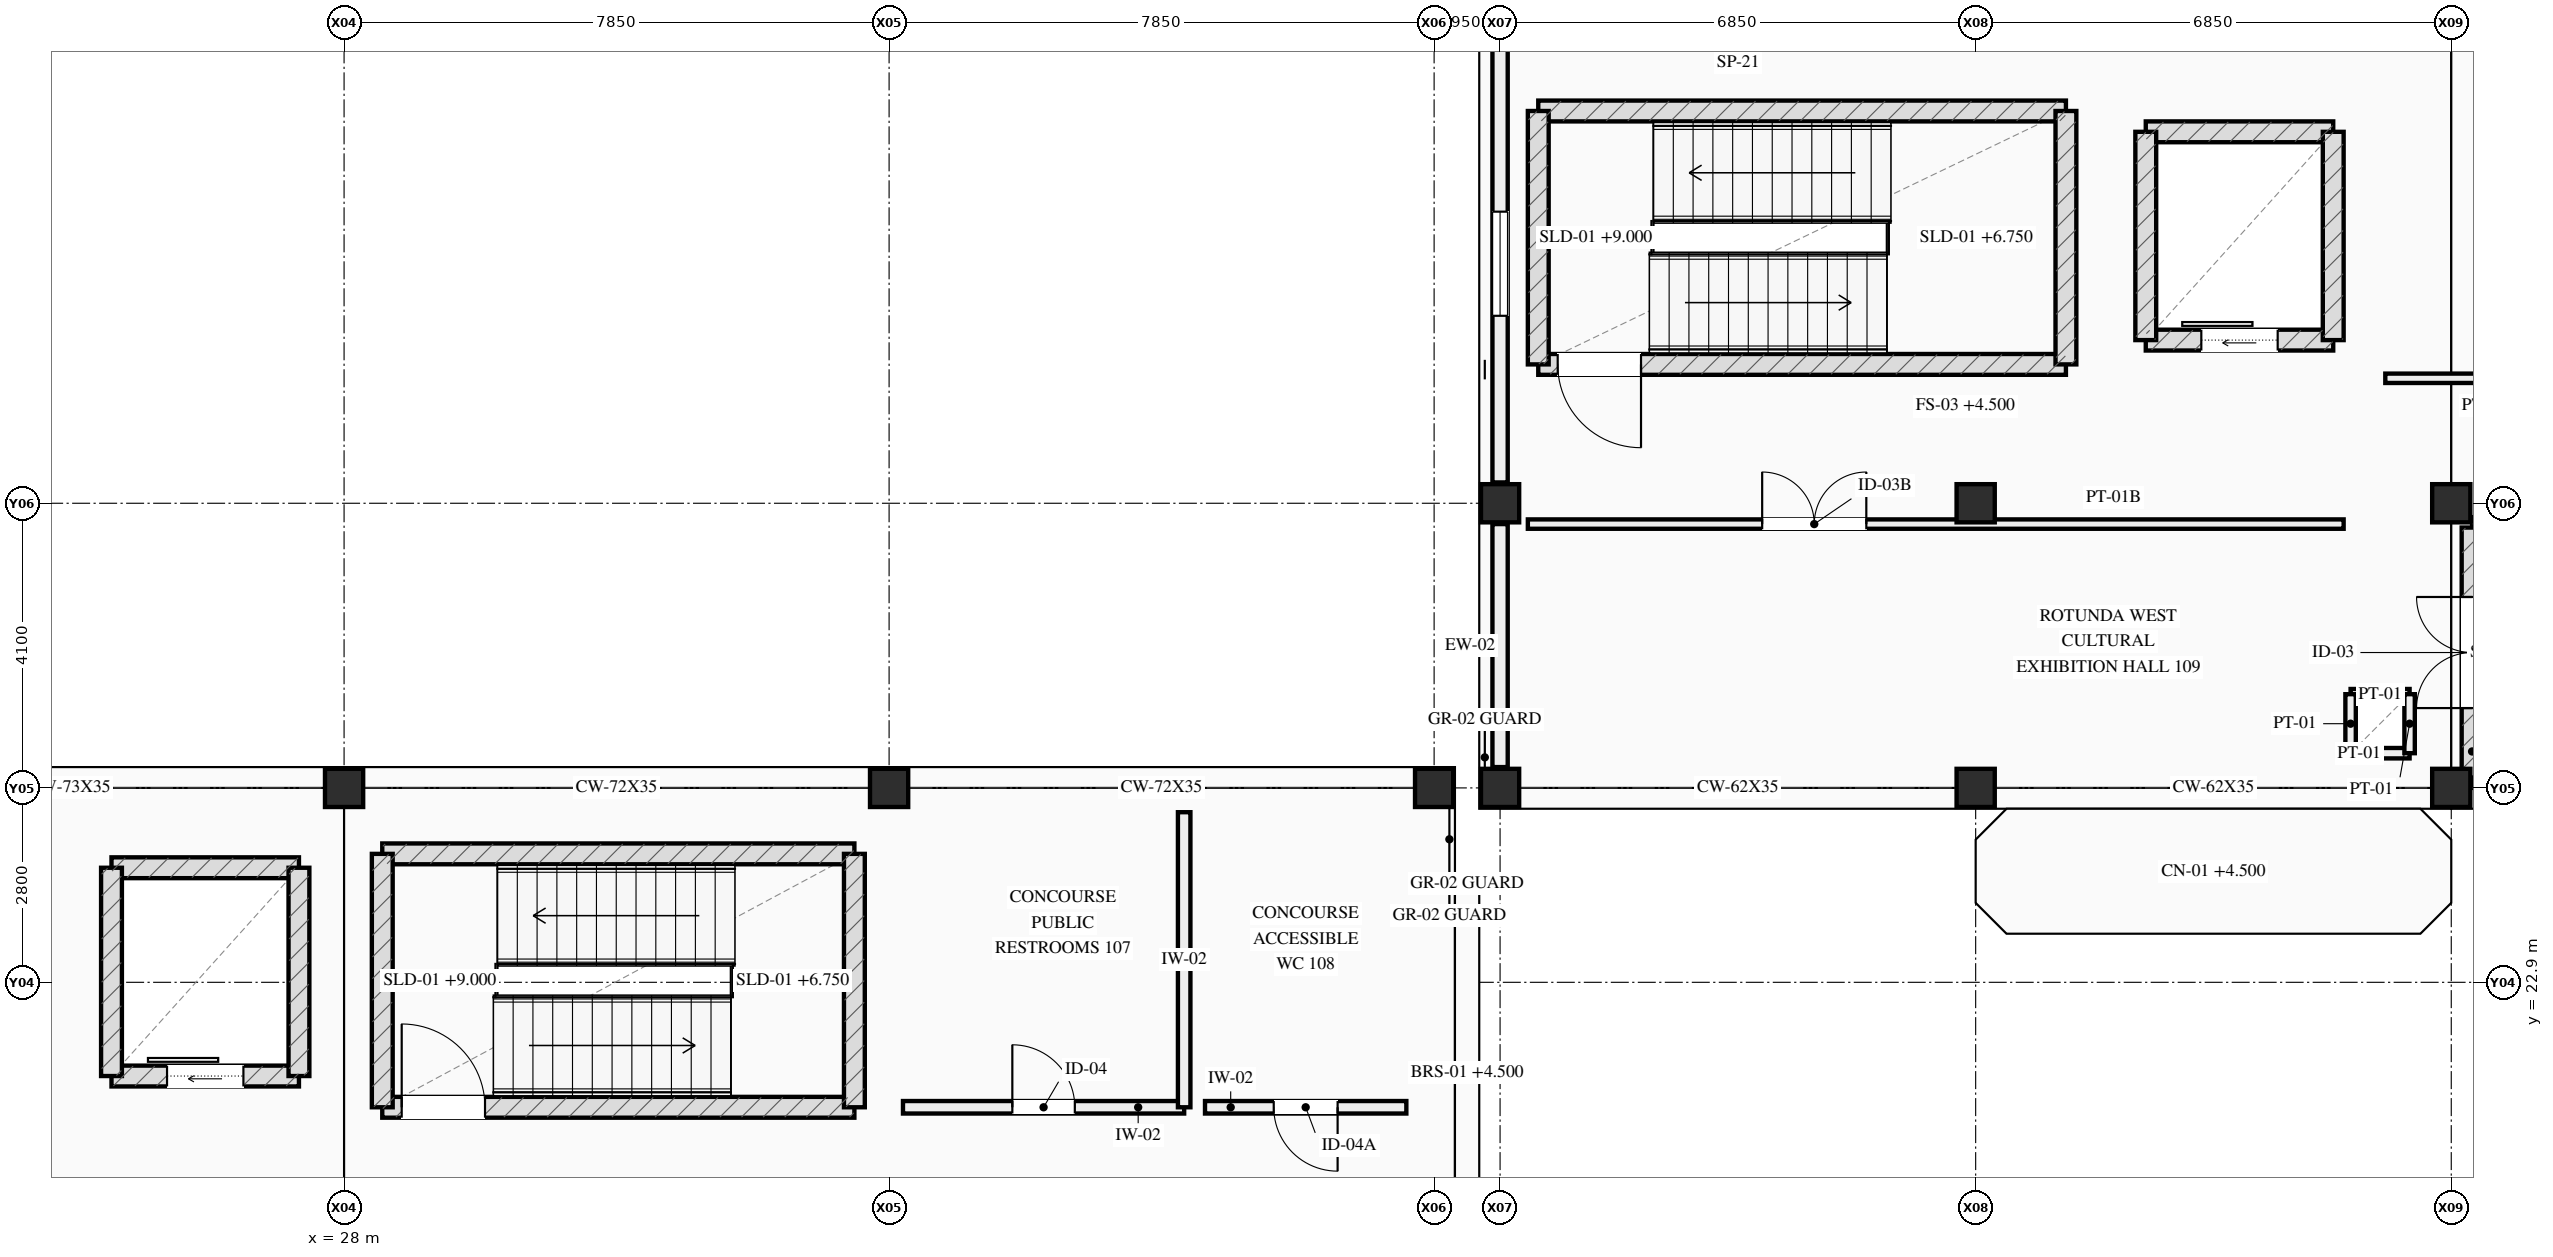
"""IFC4 building model, lengths in metres.
Left out: names, types, materials, properties, quantities, classifications, styles, units other than length and angle.
Written with IfcOpenShell. Run it as: python <this file> out.ifc"""

import sys

from ifc_helpers import new_model, si_unit, direction, frame, frame_2d, origin, origin_2d, place, context, subcontext, project, spatial, rectangle, extrude, element, fill, save


model = new_model("IFC4")
c1 = context("Model", 3, precision=1e-05, world=origin(), true_north=direction((0.0, 1.0)))
c2 = subcontext(c1, "Body", "Model", "MODEL_VIEW")
j1 = project(units=[si_unit("LENGTHUNIT", "METRE"), si_unit("PLANEANGLEUNIT", "RADIAN")], contexts=[c1])
p1 = place(None, origin())
s1 = spatial("IfcSite", under=j1, at=p1, CompositionType="ELEMENT")
p2 = place(p1, origin())
s2 = spatial("IfcBuilding", under=s1, at=p2, CompositionType="ELEMENT")
p3 = place(p2, frame((0.0, 0.0, 4.5)))
s3 = spatial("IfcBuildingStorey", under=s2, at=p3, CompositionType="ELEMENT", Elevation=4.5)
for number, where, z_axis, x_axis in (
    (1, (28.0, 25.7, 0.0), (0.0, 0.0, 1.0), (1.0, 0.0, 0.0)),
    (2, (35.85, 25.7, 0.0), (0.0, 0.0, 1.0), (1.0, 0.0, 0.0)),
    (3, (43.7, 25.7, 0.0), (0.0, 0.0, 1.0), (1.0, 0.0, 0.0)),
    (4, (44.65, 25.7, 0.0), (0.0, 0.0, 1.0), (1.0, 0.0, 0.0)),
    (5, (44.65, 29.8, 0.0), (0.0, 0.0, 1.0), (1.0, 0.0, 0.0)),
    (6, (51.5, 25.7, 0.0), (0.0, 0.0, 1.0), (1.0, 0.0, 0.0)),
    (7, (51.5, 29.8, 0.0), (0.0, 0.0, 1.0), (1.0, 0.0, 0.0)),
    (8, (58.35, 25.7, 0.0), (0.0, 0.0, 1.0), (1.0, 0.0, 0.0)),
    (9, (58.35, 29.8, 0.0), (0.0, 0.0, 1.0), (1.0, 0.0, 0.0)),
):
    element("IfcColumn", number, at=place(p3, frame(where, z_axis=z_axis, x_axis=x_axis)), inside=s3, PredefinedType="COLUMN", context=c2, shape_type="SweptSolid", body=[
        extrude(rectangle(XDim=0.55, YDim=0.55, at=origin_2d()), origin(), (0.0, 0.0, 1.0), 4.5),
    ])
p4 = place(p3, frame((44.65, 26.0, 0.0), z_axis=(0.0, 0.0, 1.0), x_axis=(0.0, 1.0, 0.0)))
e10 = element("IfcWall", 10, at=p4, inside=s3, PredefinedType="STANDARD", context=c2, shape_type="SweptSolid", body=[
    extrude(rectangle(XDim=3.5, YDim=0.22, at=frame_2d((1.75, 0.0))), origin(), (0.0, 0.0, 1.0), 3.58),
])
p5 = place(p3, frame((44.65, 30.1, 0.0), z_axis=(0.0, 0.0, 1.0), x_axis=(0.0, 1.0, 0.0)))
e11 = element("IfcWall", 11, at=p5, inside=s3, PredefinedType="STANDARD", context=c2, shape_type="SweptSolid", body=[
    extrude(rectangle(XDim=6.3, YDim=0.22, at=frame_2d((3.15, 0.0))), origin(), (0.0, 0.0, 1.0), 3.58),
])
p6 = place(p5, frame((2.4, 0.0, 0.95)))
e12 = element("IfcOpeningElement", 12, at=p6, cuts=e11, PredefinedType="OPENING", context=c2, shape_type="SweptSolid", body=[
    extrude(rectangle(XDim=1.5, YDim=1.45, at=frame_2d((0.75, 0.725))), frame((0.0, 0.12, 0.0), z_axis=(0.0, -1.0, 0.0), x_axis=(1.0, 0.0, 0.0)), (0.0, 0.0, 1.0), 0.24),
])
for number, where, z_axis, x_axis in (
    (13, (56.9, 26.2, 0.0), (0.0, 0.0, 1.0), (1.0, 0.0, 0.0)),
    (14, (56.9, 27.05, 0.0), (0.0, 0.0, 1.0), (1.0, 0.0, 0.0)),
    (15, (56.9, 26.2, 0.0), (0.0, 0.0, 1.0), (0.0, 1.0, 0.0)),
    (16, (57.75, 26.2, 0.0), (0.0, 0.0, 1.0), (0.0, 1.0, 0.0)),
):
    element("IfcWall", number, at=place(p3, frame(where, z_axis=z_axis, x_axis=x_axis)), inside=s3, PredefinedType="PARTITIONING", context=c2, shape_type="SweptSolid", body=[
        extrude(rectangle(XDim=0.85, YDim=0.15, at=frame_2d((0.425, 0.0))), origin(), (0.0, 0.0, 1.0), 3.3),
    ])
p7 = place(p3, frame((28.55, 21.1, 0.0), z_axis=(0.0, 0.0, 1.0), x_axis=(1.0, 0.0, 0.0)))
e17 = element("IfcWall", 17, at=p7, inside=s3, PredefinedType="SHEAR", context=c2, shape_type="SweptSolid", body=[
    extrude(rectangle(XDim=6.8, YDim=0.3, at=frame_2d((3.4, 0.0))), origin(), (0.0, 0.0, 1.0), 4.25),
])
p8 = place(p7, frame((0.28, 0.0, 0.0)))
e18 = element("IfcOpeningElement", 18, at=p8, cuts=e17, PredefinedType="OPENING", context=c2, shape_type="SweptSolid", body=[
    extrude(rectangle(XDim=1.2, YDim=2.2, at=frame_2d((0.6, 1.1))), frame((0.0, 0.16, 0.0), z_axis=(0.0, -1.0, 0.0), x_axis=(1.0, 0.0, 0.0)), (0.0, 0.0, 1.0), 0.32),
])
p9 = place(p3, frame((35.35, 24.75, 0.0), z_axis=(0.0, 0.0, 1.0), x_axis=(-1.0, 0.0, 0.0)))
e19 = element("IfcWall", 19, at=p9, inside=s3, PredefinedType="SHEAR", context=c2, shape_type="SweptSolid", body=[
    extrude(rectangle(XDim=6.8, YDim=0.3, at=frame_2d((3.4, 0.0))), origin(), (0.0, 0.0, 1.0), 4.25),
])
for number, where, z_axis, x_axis in (
    (20, (28.55, 24.75, 0.0), (0.0, 0.0, 1.0), (0.0, -1.0, 0.0)),
    (21, (35.35, 21.1, 0.0), (0.0, 0.0, 1.0), (0.0, 1.0, 0.0)),
):
    element("IfcWall", number, at=place(p3, frame(where, z_axis=z_axis, x_axis=x_axis)), inside=s3, PredefinedType="SHEAR", context=c2, shape_type="SweptSolid", body=[
        extrude(rectangle(XDim=3.65, YDim=0.3, at=frame_2d((1.825, 0.0))), origin(), (0.0, 0.0, 1.0), 4.25),
    ])
p10 = place(p3, frame((24.65, 21.55, 0.0), z_axis=(0.0, 0.0, 1.0), x_axis=(1.0, 0.0, 0.0)))
e22 = element("IfcWall", 22, at=p10, inside=s3, PredefinedType="SHEAR", context=c2, shape_type="SweptSolid", body=[
    extrude(rectangle(XDim=2.7, YDim=0.3, at=frame_2d((1.35, 0.0))), origin(), (0.0, 0.0, 1.0), 4.25),
])
p11 = place(p10, frame((0.8, 0.0, 0.0)))
e23 = element("IfcOpeningElement", 23, at=p11, cuts=e22, PredefinedType="OPENING", context=c2, shape_type="SweptSolid", body=[
    extrude(rectangle(XDim=1.1, YDim=2.2, at=frame_2d((0.55, 1.1))), frame((0.0, 0.16, 0.0), z_axis=(0.0, -1.0, 0.0), x_axis=(1.0, 0.0, 0.0)), (0.0, 0.0, 1.0), 0.32),
])
p12 = place(p3, frame((24.65, 24.55, 0.0), z_axis=(0.0, 0.0, 1.0), x_axis=(1.0, 0.0, 0.0)))
e24 = element("IfcWall", 24, at=p12, inside=s3, PredefinedType="SHEAR", context=c2, shape_type="SweptSolid", body=[
    extrude(rectangle(XDim=2.7, YDim=0.3, at=frame_2d((1.35, 0.0))), origin(), (0.0, 0.0, 1.0), 4.25),
])
for number, where, z_axis, x_axis in (
    (25, (24.65, 21.55, 0.0), (0.0, 0.0, 1.0), (0.0, 1.0, 0.0)),
    (26, (27.35, 21.55, 0.0), (0.0, 0.0, 1.0), (0.0, 1.0, 0.0)),
):
    element("IfcWall", number, at=place(p3, frame(where, z_axis=z_axis, x_axis=x_axis)), inside=s3, PredefinedType="SHEAR", context=c2, shape_type="SweptSolid", body=[
        extrude(rectangle(XDim=3.0, YDim=0.3, at=frame_2d((1.5, 0.0))), origin(), (0.0, 0.0, 1.0), 4.25),
    ])
p13 = place(p3, frame((45.2, 31.8, 0.0), z_axis=(0.0, 0.0, 1.0), x_axis=(1.0, 0.0, 0.0)))
e27 = element("IfcWall", 27, at=p13, inside=s3, PredefinedType="SHEAR", context=c2, shape_type="SweptSolid", body=[
    extrude(rectangle(XDim=7.6, YDim=0.3, at=frame_2d((3.8, 0.0))), origin(), (0.0, 0.0, 1.0), 4.25),
])
p14 = place(p13, frame((0.28, 0.0, 0.0)))
e28 = element("IfcOpeningElement", 28, at=p14, cuts=e27, PredefinedType="OPENING", context=c2, shape_type="SweptSolid", body=[
    extrude(rectangle(XDim=1.2, YDim=2.2, at=frame_2d((0.6, 1.1))), frame((0.0, 0.16, 0.0), z_axis=(0.0, -1.0, 0.0), x_axis=(1.0, 0.0, 0.0)), (0.0, 0.0, 1.0), 0.32),
])
p15 = place(p3, frame((52.8, 35.45, 0.0), z_axis=(0.0, 0.0, 1.0), x_axis=(-1.0, 0.0, 0.0)))
e29 = element("IfcWall", 29, at=p15, inside=s3, PredefinedType="SHEAR", context=c2, shape_type="SweptSolid", body=[
    extrude(rectangle(XDim=7.6, YDim=0.3, at=frame_2d((3.8, 0.0))), origin(), (0.0, 0.0, 1.0), 4.25),
])
for number, where, z_axis, x_axis in (
    (30, (45.2, 35.45, 0.0), (0.0, 0.0, 1.0), (0.0, -1.0, 0.0)),
    (31, (52.8, 31.8, 0.0), (0.0, 0.0, 1.0), (0.0, 1.0, 0.0)),
):
    element("IfcWall", number, at=place(p3, frame(where, z_axis=z_axis, x_axis=x_axis)), inside=s3, PredefinedType="SHEAR", context=c2, shape_type="SweptSolid", body=[
        extrude(rectangle(XDim=3.65, YDim=0.3, at=frame_2d((1.825, 0.0))), origin(), (0.0, 0.0, 1.0), 4.25),
    ])
p16 = place(p3, frame((53.95, 32.15, 0.0), z_axis=(0.0, 0.0, 1.0), x_axis=(1.0, 0.0, 0.0)))
e32 = element("IfcWall", 32, at=p16, inside=s3, PredefinedType="SHEAR", context=c2, shape_type="SweptSolid", body=[
    extrude(rectangle(XDim=2.7, YDim=0.3, at=frame_2d((1.35, 0.0))), origin(), (0.0, 0.0, 1.0), 4.25),
])
p17 = place(p16, frame((0.8, 0.0, 0.0)))
e33 = element("IfcOpeningElement", 33, at=p17, cuts=e32, PredefinedType="OPENING", context=c2, shape_type="SweptSolid", body=[
    extrude(rectangle(XDim=1.1, YDim=2.2, at=frame_2d((0.55, 1.1))), frame((0.0, 0.16, 0.0), z_axis=(0.0, -1.0, 0.0), x_axis=(1.0, 0.0, 0.0)), (0.0, 0.0, 1.0), 0.32),
])
p18 = place(p3, frame((53.95, 35.15, 0.0), z_axis=(0.0, 0.0, 1.0), x_axis=(1.0, 0.0, 0.0)))
e34 = element("IfcWall", 34, at=p18, inside=s3, PredefinedType="SHEAR", context=c2, shape_type="SweptSolid", body=[
    extrude(rectangle(XDim=2.7, YDim=0.3, at=frame_2d((1.35, 0.0))), origin(), (0.0, 0.0, 1.0), 4.25),
])
for number, where, z_axis, x_axis in (
    (35, (53.95, 32.15, 0.0), (0.0, 0.0, 1.0), (0.0, 1.0, 0.0)),
    (36, (56.65, 32.15, 0.0), (0.0, 0.0, 1.0), (0.0, 1.0, 0.0)),
):
    element("IfcWall", number, at=place(p3, frame(where, z_axis=z_axis, x_axis=x_axis)), inside=s3, PredefinedType="SHEAR", context=c2, shape_type="SweptSolid", body=[
        extrude(rectangle(XDim=3.0, YDim=0.3, at=frame_2d((1.5, 0.0))), origin(), (0.0, 0.0, 1.0), 4.25),
    ])
for number, where, z_axis, x_axis in (
    (37, (58.65, 25.85, 0.0), (0.0, 0.0, 1.0), (1.0, 0.0, 0.0)),
    (38, (58.65, 29.45, 0.0), (0.0, 0.0, 1.0), (1.0, 0.0, 0.0)),
):
    element("IfcWall", number, at=place(p3, frame(where, z_axis=z_axis, x_axis=x_axis)), inside=s3, PredefinedType="SHEAR", context=c2, shape_type="SweptSolid", body=[
        extrude(rectangle(XDim=6.4, YDim=0.3, at=frame_2d((3.2, 0.0))), origin(), (0.0, 0.0, 1.0), 4.25),
    ])
p19 = place(p3, frame((58.65, 25.85, 0.0), z_axis=(0.0, 0.0, 1.0), x_axis=(0.0, 1.0, 0.0)))
e39 = element("IfcWall", 39, at=p19, inside=s3, PredefinedType="SHEAR", context=c2, shape_type="SweptSolid", body=[
    extrude(rectangle(XDim=3.6, YDim=0.3, at=frame_2d((1.8, 0.0))), origin(), (0.0, 0.0, 1.0), 4.25),
])
p20 = place(p19, frame((1.0, 0.0, 0.0)))
e40 = element("IfcOpeningElement", 40, at=p20, cuts=e39, PredefinedType="OPENING", context=c2, shape_type="SweptSolid", body=[
    extrude(rectangle(XDim=1.6, YDim=2.2, at=frame_2d((0.8, 1.1))), frame((0.0, 0.16, 0.0), z_axis=(0.0, -1.0, 0.0), x_axis=(1.0, 0.0, 0.0)), (0.0, 0.0, 1.0), 0.32),
])
p21 = place(p3, frame((36.05, 21.1, 0.0), z_axis=(0.0, 0.0, 1.0), x_axis=(1.0, 0.0, 0.0)))
e41 = element("IfcWall", 41, at=p21, inside=s3, PredefinedType="PLUMBINGWALL", context=c2, shape_type="SweptSolid", body=[
    extrude(rectangle(XDim=4.05, YDim=0.18, at=frame_2d((2.025, 0.0))), origin(), (0.0, 0.0, 1.0), 3.3),
])
p22 = place(p21, frame((1.575, 0.0, 0.0)))
e42 = element("IfcOpeningElement", 42, at=p22, cuts=e41, PredefinedType="OPENING", context=c2, shape_type="SweptSolid", body=[
    extrude(rectangle(XDim=0.9, YDim=2.1, at=frame_2d((0.45, 1.05))), frame((0.0, 0.1, 0.0), z_axis=(0.0, -1.0, 0.0), x_axis=(1.0, 0.0, 0.0)), (0.0, 0.0, 1.0), 0.2),
])
p23 = place(p3, frame((40.1, 21.1, 0.0), z_axis=(0.0, 0.0, 1.0), x_axis=(0.0, 1.0, 0.0)))
e43 = element("IfcWall", 43, at=p23, inside=s3, PredefinedType="PLUMBINGWALL", context=c2, shape_type="SweptSolid", body=[
    extrude(rectangle(XDim=4.25, YDim=0.18, at=frame_2d((2.125, 0.0))), origin(), (0.0, 0.0, 1.0), 3.3),
])
p24 = place(p3, frame((40.4, 21.1, 0.0), z_axis=(0.0, 0.0, 1.0), x_axis=(1.0, 0.0, 0.0)))
e44 = element("IfcWall", 44, at=p24, inside=s3, PredefinedType="PLUMBINGWALL", context=c2, shape_type="SweptSolid", body=[
    extrude(rectangle(XDim=2.9, YDim=0.18, at=frame_2d((1.45, 0.0))), origin(), (0.0, 0.0, 1.0), 3.3),
])
p25 = place(p24, frame((0.99, 0.0, 0.0)))
e45 = element("IfcOpeningElement", 45, at=p25, cuts=e44, PredefinedType="OPENING", context=c2, shape_type="SweptSolid", body=[
    extrude(rectangle(XDim=0.92, YDim=2.1, at=frame_2d((0.46, 1.05))), frame((0.0, 0.1, 0.0), z_axis=(0.0, -1.0, 0.0), x_axis=(1.0, 0.0, 0.0)), (0.0, 0.0, 1.0), 0.2),
])
p26 = place(p3, frame((45.05, 29.5, 0.0), z_axis=(0.0, 0.0, 1.0), x_axis=(1.0, 0.0, 0.0)))
e46 = element("IfcWall", 46, at=p26, inside=s3, PredefinedType="PARTITIONING", context=c2, shape_type="SweptSolid", body=[
    extrude(rectangle(XDim=11.75, YDim=0.135, at=frame_2d((5.875, 0.0))), origin(), (0.0, 0.0, 1.0), 3.3),
])
p27 = place(p26, frame((3.375, 0.0, 0.0)))
e47 = element("IfcOpeningElement", 47, at=p27, cuts=e46, PredefinedType="OPENING", context=c2, shape_type="SweptSolid", body=[
    extrude(rectangle(XDim=1.5, YDim=2.2, at=frame_2d((0.75, 1.1))), frame((0.0, 0.077, 0.0), z_axis=(0.0, -1.0, 0.0), x_axis=(1.0, 0.0, 0.0)), (0.0, 0.0, 1.0), 0.155),
])
p28 = place(p3, frame((57.4, 31.6, 0.0), z_axis=(0.0, 0.0, 1.0), x_axis=(1.0, 0.0, 0.0)))
e48 = element("IfcWall", 48, at=p28, inside=s3, PredefinedType="PARTITIONING", context=c2, shape_type="SweptSolid", body=[
    extrude(rectangle(XDim=4.6, YDim=0.135, at=frame_2d((2.3, 0.0))), origin(), (0.0, 0.0, 1.0), 3.3),
])
p29 = place(p28, frame((3.25, 0.0, 0.0)))
e49 = element("IfcOpeningElement", 49, at=p29, cuts=e48, PredefinedType="OPENING", context=c2, shape_type="SweptSolid", body=[
    extrude(rectangle(XDim=0.9, YDim=2.15, at=frame_2d((0.45, 1.075))), frame((0.0, 0.077, 0.0), z_axis=(0.0, -1.0, 0.0), x_axis=(1.0, 0.0, 0.0)), (0.0, 0.0, 1.0), 0.155),
])
p30 = place(p6, origin())
e50 = element("IfcWindow", 50, at=p30, inside=s3, PartitioningType="SINGLE_PANEL", PredefinedType="WINDOW", context=c2, shape_type="SweptSolid", body=[
    extrude(rectangle(XDim=1.5, YDim=1.45, at=frame_2d((0.75, 0.725))), frame((0.0, 0.03, 0.0), z_axis=(0.0, -1.0, 0.0), x_axis=(1.0, 0.0, 0.0)), (0.0, 0.0, 1.0), 0.06),
])
fill(e12, e50)
p31 = place(p8, origin())
e51 = element("IfcDoor", 51, at=p31, inside=s3, OperationType="SINGLE_SWING_LEFT", PredefinedType="DOOR", context=c2, shape_type="SweptSolid", body=[
    extrude(rectangle(XDim=1.2, YDim=2.2, at=frame_2d((0.6, 1.1))), frame((0.0, 0.025, 0.0), z_axis=(0.0, -1.0, 0.0), x_axis=(1.0, 0.0, 0.0)), (0.0, 0.0, 1.0), 0.05),
])
fill(e18, e51)
p32 = place(p11, origin())
e52 = element("IfcDoor", 52, at=p32, inside=s3, OperationType="SLIDING_TO_LEFT", PredefinedType="DOOR", context=c2, shape_type="SweptSolid", body=[
    extrude(rectangle(XDim=1.1, YDim=2.2, at=frame_2d((0.55, 1.1))), frame((0.0, 0.025, 0.0), z_axis=(0.0, -1.0, 0.0), x_axis=(1.0, 0.0, 0.0)), (0.0, 0.0, 1.0), 0.05),
])
fill(e23, e52)
p33 = place(p14, origin())
e53 = element("IfcDoor", 53, at=p33, inside=s3, OperationType="SINGLE_SWING_RIGHT", PredefinedType="DOOR", context=c2, shape_type="SweptSolid", body=[
    extrude(rectangle(XDim=1.2, YDim=2.2, at=frame_2d((0.6, 1.1))), frame((0.0, 0.025, 0.0), z_axis=(0.0, -1.0, 0.0), x_axis=(1.0, 0.0, 0.0)), (0.0, 0.0, 1.0), 0.05),
])
fill(e28, e53)
p34 = place(p17, origin())
e54 = element("IfcDoor", 54, at=p34, inside=s3, OperationType="SLIDING_TO_LEFT", PredefinedType="DOOR", context=c2, shape_type="SweptSolid", body=[
    extrude(rectangle(XDim=1.1, YDim=2.2, at=frame_2d((0.55, 1.1))), frame((0.0, 0.025, 0.0), z_axis=(0.0, -1.0, 0.0), x_axis=(1.0, 0.0, 0.0)), (0.0, 0.0, 1.0), 0.05),
])
fill(e33, e54)
p35 = place(p20, origin())
e55 = element("IfcDoor", 55, at=p35, inside=s3, OperationType="DOUBLE_DOOR_SINGLE_SWING", PredefinedType="DOOR", context=c2, shape_type="SweptSolid", body=[
    extrude(rectangle(XDim=1.6, YDim=2.2, at=frame_2d((0.8, 1.1))), frame((0.0, 0.025, 0.0), z_axis=(0.0, -1.0, 0.0), x_axis=(1.0, 0.0, 0.0)), (0.0, 0.0, 1.0), 0.05),
])
fill(e40, e55)
p36 = place(p22, origin())
e56 = element("IfcDoor", 56, at=p36, inside=s3, OperationType="SINGLE_SWING_LEFT", PredefinedType="DOOR", context=c2, shape_type="SweptSolid", body=[
    extrude(rectangle(XDim=0.9, YDim=2.1, at=frame_2d((0.45, 1.05))), frame((0.0, 0.025, 0.0), z_axis=(0.0, -1.0, 0.0), x_axis=(1.0, 0.0, 0.0)), (0.0, 0.0, 1.0), 0.05),
])
fill(e42, e56)
p37 = place(p25, origin())
e57 = element("IfcDoor", 57, at=p37, inside=s3, OperationType="SINGLE_SWING_RIGHT", PredefinedType="DOOR", context=c2, shape_type="SweptSolid", body=[
    extrude(rectangle(XDim=0.92, YDim=2.1, at=frame_2d((0.46, 1.05))), frame((0.0, 0.025, 0.0), z_axis=(0.0, -1.0, 0.0), x_axis=(1.0, 0.0, 0.0)), (0.0, 0.0, 1.0), 0.05),
])
fill(e45, e57)
p38 = place(p27, origin())
e58 = element("IfcDoor", 58, at=p38, inside=s3, OperationType="DOUBLE_DOOR_SINGLE_SWING", PredefinedType="DOOR", context=c2, shape_type="SweptSolid", body=[
    extrude(rectangle(XDim=1.5, YDim=2.2, at=frame_2d((0.75, 1.1))), frame((0.0, 0.025, 0.0), z_axis=(0.0, -1.0, 0.0), x_axis=(1.0, 0.0, 0.0)), (0.0, 0.0, 1.0), 0.05),
])
fill(e47, e58)
save(model, sys.argv[1])
